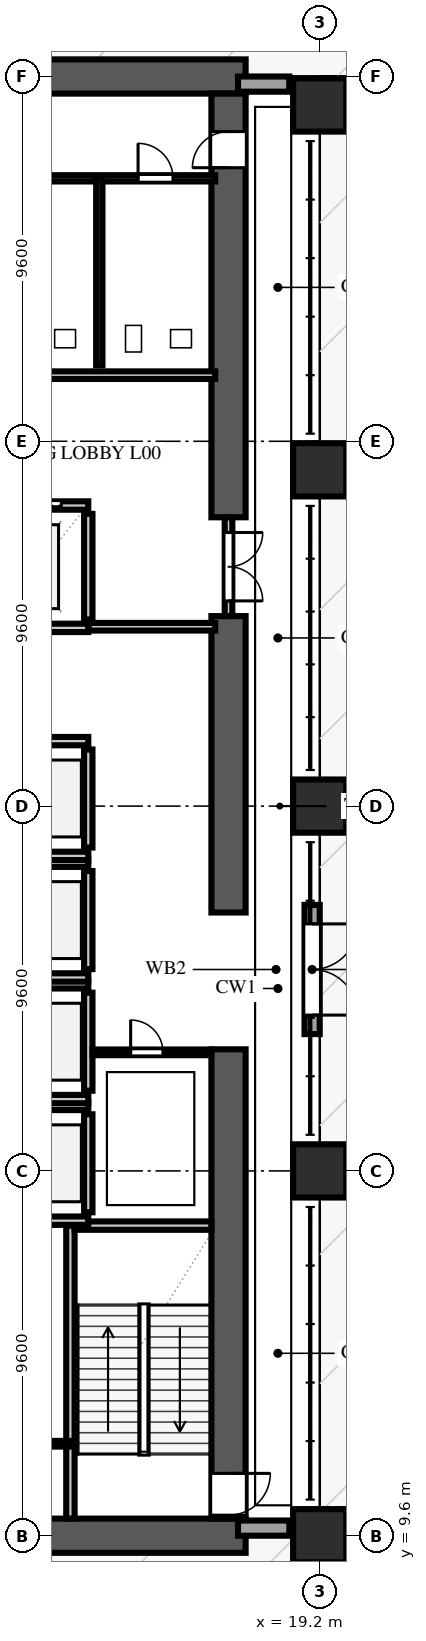
"""IFC4 building model, lengths in metres.
Left out: names, types, materials, properties, quantities, classifications, styles, units other than length and angle.
Written with IfcOpenShell. Run it as: python <this file> out.ifc"""

import sys

from ifc_helpers import new_model, si_unit, direction, frame, frame_2d, origin, origin_2d, place, context, subcontext, project, spatial, rectangle, extrude, element, fill, save


model = new_model("IFC4")
c1 = context("Model", 3, precision=1e-05, world=origin(), true_north=direction((0.0, 1.0)))
c2 = subcontext(c1, "Body", "Model", "MODEL_VIEW")
j1 = project(units=[si_unit("LENGTHUNIT", "METRE"), si_unit("PLANEANGLEUNIT", "RADIAN")], contexts=[c1])
p1 = place(None, origin())
s1 = spatial("IfcSite", under=j1, at=p1, CompositionType="ELEMENT")
p2 = place(p1, origin())
s2 = spatial("IfcBuilding", under=s1, at=p2, CompositionType="ELEMENT")
p3 = place(p2, origin())
s3 = spatial("IfcBuildingStorey", under=s2, at=p3, CompositionType="ELEMENT", Elevation=0.0)
p4 = place(p3, frame((2.65, 9.6, 0.0), z_axis=(0.0, 0.0, 1.0), x_axis=(1.0, 0.0, 0.0)))
e1 = element("IfcWall", 1, at=p4, inside=s3, PredefinedType="SHEAR", context=c2, shape_type="SweptSolid", body=[
    extrude(rectangle(XDim=14.6, YDim=0.9, at=frame_2d((7.3, 0.0))), origin(), (0.0, 0.0, 1.0), 4.86),
])
p5 = place(p4, frame((1.6, 0.0, 0.0)))
e2 = element("IfcOpeningElement", 2, at=p5, cuts=e1, PredefinedType="OPENING", context=c2, shape_type="SweptSolid", body=[
    extrude(rectangle(XDim=1.8, YDim=2.2, at=frame_2d((0.9, 1.1))), frame((0.0, 0.462, 0.0), z_axis=(0.0, -1.0, 0.0), x_axis=(1.0, 0.0, 0.0)), (0.0, 0.0, 1.0), 0.924),
])
p6 = place(p3, frame((2.65, 48.0, 0.0), z_axis=(0.0, 0.0, 1.0), x_axis=(1.0, 0.0, 0.0)))
e3 = element("IfcWall", 3, at=p6, inside=s3, PredefinedType="SHEAR", context=c2, shape_type="SweptSolid", body=[
    extrude(rectangle(XDim=14.6, YDim=0.9, at=frame_2d((7.3, 0.0))), origin(), (0.0, 0.0, 1.0), 4.86),
])
p7 = place(p3, frame((16.8, 10.05, 0.0), z_axis=(0.0, 0.0, 1.0), x_axis=(0.0, 1.0, 0.0)))
e4 = element("IfcWall", 4, at=p7, inside=s3, PredefinedType="SHEAR", context=c2, shape_type="SweptSolid", body=[
    extrude(rectangle(XDim=12.35, YDim=0.9, at=frame_2d((6.175, 0.0))), origin(), (0.0, 0.0, 1.0), 4.86),
])
p8 = place(p7, frame((0.09, 0.0, 0.0)))
e5 = element("IfcOpeningElement", 5, at=p8, cuts=e4, PredefinedType="OPENING", context=c2, shape_type="SweptSolid", body=[
    extrude(rectangle(XDim=1.1, YDim=2.2, at=frame_2d((0.55, 1.1))), frame((0.0, 0.462, 0.0), z_axis=(0.0, -1.0, 0.0), x_axis=(1.0, 0.0, 0.0)), (0.0, 0.0, 1.0), 0.924),
])
p9 = place(p3, frame((16.8, 26.0, 0.0), z_axis=(0.0, 0.0, 1.0), x_axis=(0.0, 1.0, 0.0)))
e6 = element("IfcWall", 6, at=p9, inside=s3, PredefinedType="SHEAR", context=c2, shape_type="SweptSolid", body=[
    extrude(rectangle(XDim=7.8, YDim=0.9, at=frame_2d((3.9, 0.0))), origin(), (0.0, 0.0, 1.0), 4.86),
])
p10 = place(p3, frame((16.8, 36.4, 0.0), z_axis=(0.0, 0.0, 1.0), x_axis=(0.0, 1.0, 0.0)))
e7 = element("IfcWall", 7, at=p10, inside=s3, PredefinedType="SHEAR", context=c2, shape_type="SweptSolid", body=[
    extrude(rectangle(XDim=11.15, YDim=0.9, at=frame_2d((5.575, 0.0))), origin(), (0.0, 0.0, 1.0), 4.86),
])
p11 = place(p10, frame((9.2, 0.0, 0.0)))
e8 = element("IfcOpeningElement", 8, at=p11, cuts=e7, PredefinedType="OPENING", context=c2, shape_type="SweptSolid", body=[
    extrude(rectangle(XDim=0.95, YDim=2.15, at=frame_2d((0.475, 1.075))), frame((0.0, 0.462, 0.0), z_axis=(0.0, -1.0, 0.0), x_axis=(1.0, 0.0, 0.0)), (0.0, 0.0, 1.0), 0.924),
])
for number, where, z_axis, x_axis in (
    (9, (19.2, 9.6, 0.0), (0.0, 0.0, 1.0), (1.0, 0.0, 0.0)),
    (10, (19.2, 19.2, 0.0), (0.0, 0.0, 1.0), (1.0, 0.0, 0.0)),
    (11, (19.2, 28.8, 0.0), (0.0, 0.0, 1.0), (1.0, 0.0, 0.0)),
    (12, (19.2, 37.65, 0.0), (0.0, 0.0, 1.0), (1.0, 0.0, 0.0)),
    (13, (19.2, 47.25, 0.0), (0.0, 0.0, 1.0), (1.0, 0.0, 0.0)),
):
    element("IfcColumn", number, at=place(p3, frame(where, z_axis=z_axis, x_axis=x_axis)), inside=s3, PredefinedType="USERDEFINED", context=c2, shape_type="SweptSolid", body=[
        extrude(rectangle(XDim=1.4, YDim=1.4, at=origin_2d()), origin(), (0.0, 0.0, 1.0), 5.2),
    ])
p12 = place(p3, frame((17.05, 9.8, 0.0), z_axis=(0.0, 0.0, 1.0), x_axis=(1.0, 0.0, 0.0)))
e14 = element("IfcWall", 14, at=p12, inside=s3, PredefinedType="SOLIDWALL", context=c2, shape_type="SweptSolid", body=[
    extrude(rectangle(XDim=1.35, YDim=0.4, at=frame_2d((0.675, 0.0))), origin(), (0.0, 0.0, 1.0), 4.11),
])
p13 = place(p3, frame((17.05, 47.8, 0.0), z_axis=(0.0, 0.0, 1.0), x_axis=(1.0, 0.0, 0.0)))
e15 = element("IfcWall", 15, at=p13, inside=s3, PredefinedType="SOLIDWALL", context=c2, shape_type="SweptSolid", body=[
    extrude(rectangle(XDim=1.35, YDim=0.4, at=frame_2d((0.675, 0.0))), origin(), (0.0, 0.0, 1.0), 4.86),
])
p14 = place(p3, frame((19.0, 22.8, 0.0), z_axis=(0.0, 0.0, 1.0), x_axis=(0.0, 1.0, 0.0)))
e16 = element("IfcWall", 16, at=p14, inside=s3, PredefinedType="SOLIDWALL", context=c2, shape_type="SweptSolid", body=[
    extrude(rectangle(XDim=3.4, YDim=0.4, at=frame_2d((1.7, 0.0))), origin(), (0.0, 0.0, 1.0), 3.2),
])
p15 = place(p14, frame((0.5, 0.0, 0.0)))
e17 = element("IfcOpeningElement", 17, at=p15, cuts=e16, PredefinedType="OPENING", context=c2, shape_type="SweptSolid", body=[
    extrude(rectangle(XDim=2.4, YDim=2.6, at=frame_2d((1.2, 1.3))), frame((0.0, 0.212, 0.0), z_axis=(0.0, -1.0, 0.0), x_axis=(1.0, 0.0, 0.0)), (0.0, 0.0, 1.0), 0.424),
])
p16 = place(p3, frame((12.64, 10.05, 0.0), z_axis=(0.0, 0.0, 1.0), x_axis=(0.0, 1.0, 0.0)))
e18 = element("IfcWall", 18, at=p16, inside=s3, PredefinedType="SOLIDWALL", context=c2, shape_type="SweptSolid", body=[
    extrude(rectangle(XDim=7.71, YDim=0.22, at=frame_2d((3.855, 0.0))), origin(), (0.0, 0.0, 1.0), 4.86),
])
p17 = place(p3, frame((12.75, 17.76, 0.0), z_axis=(0.0, 0.0, 1.0), x_axis=(1.0, 0.0, 0.0)))
e19 = element("IfcWall", 19, at=p17, inside=s3, PredefinedType="SOLIDWALL", context=c2, shape_type="SweptSolid", body=[
    extrude(rectangle(XDim=3.6, YDim=0.22, at=frame_2d((1.8, 0.0))), origin(), (0.0, 0.0, 1.0), 4.86),
])
p18 = place(p3, frame((13.11, 18.11, 0.0), z_axis=(0.0, 0.0, 1.0), x_axis=(0.0, 1.0, 0.0)))
e20 = element("IfcWall", 20, at=p18, inside=s3, PredefinedType="SOLIDWALL", context=c2, shape_type="SweptSolid", body=[
    extrude(rectangle(XDim=2.58, YDim=0.22, at=frame_2d((1.29, 0.0))), origin(), (0.0, 0.0, 1.0), 4.86),
])
for number, where, z_axis, x_axis in (
    (21, (10.49, 17.89, 0.0), (0.0, 0.0, 1.0), (1.0, 0.0, 0.0)),
    (22, (10.49, 20.91, 0.0), (0.0, 0.0, 1.0), (1.0, 0.0, 0.0)),
):
    element("IfcWall", number, at=place(p3, frame(where, z_axis=z_axis, x_axis=x_axis)), inside=s3, PredefinedType="SOLIDWALL", context=c2, shape_type="SweptSolid", body=[
        extrude(rectangle(XDim=2.62, YDim=0.22, at=frame_2d((1.31, 0.0))), origin(), (0.0, 0.0, 1.0), 4.86),
    ])
p19 = place(p3, frame((13.11, 21.31, 0.0), z_axis=(0.0, 0.0, 1.0), x_axis=(0.0, 1.0, 0.0)))
e23 = element("IfcWall", 23, at=p19, inside=s3, PredefinedType="SOLIDWALL", context=c2, shape_type="SweptSolid", body=[
    extrude(rectangle(XDim=2.58, YDim=0.22, at=frame_2d((1.29, 0.0))), origin(), (0.0, 0.0, 1.0), 4.86),
])
for number, where, z_axis, x_axis in (
    (24, (10.49, 21.09, 0.0), (0.0, 0.0, 1.0), (1.0, 0.0, 0.0)),
    (25, (10.49, 24.11, 0.0), (0.0, 0.0, 1.0), (1.0, 0.0, 0.0)),
):
    element("IfcWall", number, at=place(p3, frame(where, z_axis=z_axis, x_axis=x_axis)), inside=s3, PredefinedType="SOLIDWALL", context=c2, shape_type="SweptSolid", body=[
        extrude(rectangle(XDim=2.62, YDim=0.22, at=frame_2d((1.31, 0.0))), origin(), (0.0, 0.0, 1.0), 4.86),
    ])
p20 = place(p3, frame((13.11, 24.51, 0.0), z_axis=(0.0, 0.0, 1.0), x_axis=(0.0, 1.0, 0.0)))
e26 = element("IfcWall", 26, at=p20, inside=s3, PredefinedType="SOLIDWALL", context=c2, shape_type="SweptSolid", body=[
    extrude(rectangle(XDim=2.58, YDim=0.22, at=frame_2d((1.29, 0.0))), origin(), (0.0, 0.0, 1.0), 4.86),
])
for number, where, z_axis, x_axis in (
    (27, (10.49, 24.29, 0.0), (0.0, 0.0, 1.0), (1.0, 0.0, 0.0)),
    (28, (10.49, 27.31, 0.0), (0.0, 0.0, 1.0), (1.0, 0.0, 0.0)),
):
    element("IfcWall", number, at=place(p3, frame(where, z_axis=z_axis, x_axis=x_axis)), inside=s3, PredefinedType="SOLIDWALL", context=c2, shape_type="SweptSolid", body=[
        extrude(rectangle(XDim=2.62, YDim=0.22, at=frame_2d((1.31, 0.0))), origin(), (0.0, 0.0, 1.0), 4.86),
    ])
p21 = place(p3, frame((13.11, 27.71, 0.0), z_axis=(0.0, 0.0, 1.0), x_axis=(0.0, 1.0, 0.0)))
e29 = element("IfcWall", 29, at=p21, inside=s3, PredefinedType="SOLIDWALL", context=c2, shape_type="SweptSolid", body=[
    extrude(rectangle(XDim=2.58, YDim=0.22, at=frame_2d((1.29, 0.0))), origin(), (0.0, 0.0, 1.0), 4.86),
])
for number, where, z_axis, x_axis in (
    (30, (10.49, 27.49, 0.0), (0.0, 0.0, 1.0), (1.0, 0.0, 0.0)),
    (31, (10.49, 30.51, 0.0), (0.0, 0.0, 1.0), (1.0, 0.0, 0.0)),
):
    element("IfcWall", number, at=place(p3, frame(where, z_axis=z_axis, x_axis=x_axis)), inside=s3, PredefinedType="SOLIDWALL", context=c2, shape_type="SweptSolid", body=[
        extrude(rectangle(XDim=2.62, YDim=0.22, at=frame_2d((1.31, 0.0))), origin(), (0.0, 0.0, 1.0), 4.86),
    ])
p22 = place(p3, frame((13.11, 33.71, 0.0), z_axis=(0.0, 0.0, 1.0), x_axis=(0.0, 1.0, 0.0)))
e32 = element("IfcWall", 32, at=p22, inside=s3, PredefinedType="SOLIDWALL", context=c2, shape_type="SweptSolid", body=[
    extrude(rectangle(XDim=2.78, YDim=0.22, at=frame_2d((1.39, 0.0))), origin(), (0.0, 0.0, 1.0), 4.86),
])
p23 = place(p3, frame((10.49, 33.49, 0.0), z_axis=(0.0, 0.0, 1.0), x_axis=(1.0, 0.0, 0.0)))
e33 = element("IfcWall", 33, at=p23, inside=s3, PredefinedType="SOLIDWALL", context=c2, shape_type="SweptSolid", body=[
    extrude(rectangle(XDim=2.62, YDim=0.22, at=frame_2d((1.31, 0.0))), origin(), (0.0, 0.0, 1.0), 4.86),
])
p24 = place(p3, frame((10.49, 36.71, 0.0), z_axis=(0.0, 0.0, 1.0), x_axis=(1.0, 0.0, 0.0)))
e34 = element("IfcWall", 34, at=p24, inside=s3, PredefinedType="SOLIDWALL", context=c2, shape_type="SweptSolid", body=[
    extrude(rectangle(XDim=2.62, YDim=0.22, at=frame_2d((1.31, 0.0))), origin(), (0.0, 0.0, 1.0), 4.86),
])
p25 = place(p24, frame((0.71, 0.0, 0.0)))
e35 = element("IfcOpeningElement", 35, at=p25, cuts=e34, PredefinedType="OPENING", context=c2, shape_type="SweptSolid", body=[
    extrude(rectangle(XDim=1.2, YDim=2.2, at=frame_2d((0.6, 1.1))), frame((0.0, 0.122, 0.0), z_axis=(0.0, -1.0, 0.0), x_axis=(1.0, 0.0, 0.0)), (0.0, 0.0, 1.0), 0.244),
])
p26 = place(p3, frame((13.12, 33.52, 0.0), z_axis=(0.0, 0.0, 1.0), x_axis=(1.0, 0.0, 0.0)))
e36 = element("IfcWall", 36, at=p26, inside=s3, PredefinedType="SOLIDWALL", context=c2, shape_type="SweptSolid", body=[
    extrude(rectangle(XDim=3.33, YDim=0.2, at=frame_2d((1.665, 0.0))), origin(), (0.0, 0.0, 1.0), 4.86),
])
p27 = place(p3, frame((6.32, 40.14, 0.0), z_axis=(0.0, 0.0, 1.0), x_axis=(1.0, 0.0, 0.0)))
e37 = element("IfcWall", 37, at=p27, inside=s3, PredefinedType="SOLIDWALL", context=c2, shape_type="SweptSolid", body=[
    extrude(rectangle(XDim=10.13, YDim=0.2, at=frame_2d((5.065, 0.0))), origin(), (0.0, 0.0, 1.0), 4.86),
])
p28 = place(p3, frame((16.8, 33.8, 0.0), z_axis=(0.0, 0.0, 1.0), x_axis=(0.0, 1.0, 0.0)))
e38 = element("IfcWall", 38, at=p28, inside=s3, PredefinedType="SOLIDWALL", context=c2, shape_type="SweptSolid", body=[
    extrude(rectangle(XDim=2.6, YDim=0.2, at=frame_2d((1.3, 0.0))), origin(), (0.0, 0.0, 1.0), 4.86),
])
p29 = place(p28, frame((0.4, 0.0, 0.0)))
e39 = element("IfcOpeningElement", 39, at=p29, cuts=e38, PredefinedType="OPENING", context=c2, shape_type="SweptSolid", body=[
    extrude(rectangle(XDim=1.8, YDim=2.2, at=frame_2d((0.9, 1.1))), frame((0.0, 0.112, 0.0), z_axis=(0.0, -1.0, 0.0), x_axis=(1.0, 0.0, 0.0)), (0.0, 0.0, 1.0), 0.224),
])
p30 = place(p3, frame((10.55, 12.02, 0.0), z_axis=(0.0, 0.0, 1.0), x_axis=(1.0, 0.0, 0.0)))
e40 = element("IfcWall", 40, at=p30, inside=s3, PredefinedType="PARTITIONING", context=c2, shape_type="SweptSolid", body=[
    extrude(rectangle(XDim=2.08, YDim=0.15, at=frame_2d((1.04, 0.0))), origin(), (0.0, 0.0, 1.0), 4.86),
])
p31 = place(p30, frame((0.5, 0.0, 0.0)))
e41 = element("IfcOpeningElement", 41, at=p31, cuts=e40, PredefinedType="OPENING", context=c2, shape_type="SweptSolid", body=[
    extrude(rectangle(XDim=0.85, YDim=2.1, at=frame_2d((0.425, 1.05))), frame((0.0, 0.087, 0.0), z_axis=(0.0, -1.0, 0.0), x_axis=(1.0, 0.0, 0.0)), (0.0, 0.0, 1.0), 0.174),
])
p32 = place(p3, frame((13.225, 22.32, 0.0), z_axis=(0.0, 0.0, 1.0), x_axis=(1.0, 0.0, 0.0)))
e42 = element("IfcWall", 42, at=p32, inside=s3, PredefinedType="PARTITIONING", context=c2, shape_type="SweptSolid", body=[
    extrude(rectangle(XDim=3.12, YDim=0.15, at=frame_2d((1.56, 0.0))), origin(), (0.0, 0.0, 1.0), 4.86),
])
p33 = place(p32, frame((1.0, 0.0, 0.0)))
e43 = element("IfcOpeningElement", 43, at=p33, cuts=e42, PredefinedType="OPENING", context=c2, shape_type="SweptSolid", body=[
    extrude(rectangle(XDim=0.85, YDim=2.1, at=frame_2d((0.425, 1.05))), frame((0.0, 0.087, 0.0), z_axis=(0.0, -1.0, 0.0), x_axis=(1.0, 0.0, 0.0)), (0.0, 0.0, 1.0), 0.174),
])
p34 = place(p3, frame((6.32, 45.32, 0.0), z_axis=(0.0, 0.0, 1.0), x_axis=(1.0, 0.0, 0.0)))
e44 = element("IfcWall", 44, at=p34, inside=s3, PredefinedType="PLUMBINGWALL", context=c2, shape_type="SweptSolid", body=[
    extrude(rectangle(XDim=10.13, YDim=0.165, at=frame_2d((5.065, 0.0))), origin(), (0.0, 0.0, 1.0), 4.86),
])
p35 = place(p34, frame((0.9, 0.0, 0.0)))
e45 = element("IfcOpeningElement", 45, at=p35, cuts=e44, PredefinedType="OPENING", context=c2, shape_type="SweptSolid", body=[
    extrude(rectangle(XDim=0.92, YDim=2.15, at=frame_2d((0.46, 1.075))), frame((0.0, 0.094, 0.0), z_axis=(0.0, -1.0, 0.0), x_axis=(1.0, 0.0, 0.0)), (0.0, 0.0, 1.0), 0.189),
])
p36 = place(p34, frame((4.6, 0.0, 0.0)))
e46 = element("IfcOpeningElement", 46, at=p36, cuts=e44, PredefinedType="OPENING", context=c2, shape_type="SweptSolid", body=[
    extrude(rectangle(XDim=0.92, YDim=2.15, at=frame_2d((0.46, 1.075))), frame((0.0, 0.094, 0.0), z_axis=(0.0, -1.0, 0.0), x_axis=(1.0, 0.0, 0.0)), (0.0, 0.0, 1.0), 0.189),
])
p37 = place(p34, frame((8.1, 0.0, 0.0)))
e47 = element("IfcOpeningElement", 47, at=p37, cuts=e44, PredefinedType="OPENING", context=c2, shape_type="SweptSolid", body=[
    extrude(rectangle(XDim=0.92, YDim=2.15, at=frame_2d((0.46, 1.075))), frame((0.0, 0.094, 0.0), z_axis=(0.0, -1.0, 0.0), x_axis=(1.0, 0.0, 0.0)), (0.0, 0.0, 1.0), 0.189),
])
p38 = place(p3, frame((13.4, 40.4, 0.0), z_axis=(0.0, 0.0, 1.0), x_axis=(0.0, 1.0, 0.0)))
e48 = element("IfcWall", 48, at=p38, inside=s3, PredefinedType="PLUMBINGWALL", context=c2, shape_type="SweptSolid", body=[
    extrude(rectangle(XDim=4.92, YDim=0.165, at=frame_2d((2.46, 0.0))), origin(), (0.0, 0.0, 1.0), 4.86),
])
p39 = place(p15, frame((2.4, 0.0, 0.0), z_axis=(0.0, 0.0, 1.0), x_axis=(-1.0, 0.0, 0.0)))
e49 = element("IfcDoor", 49, at=p39, inside=s3, OperationType="DOUBLE_SWING_LEFT", PredefinedType="DOOR", context=c2, shape_type="SweptSolid", body=[
    extrude(rectangle(XDim=2.4, YDim=2.6, at=frame_2d((1.2, 1.3))), frame((0.0, 0.025, 0.0), z_axis=(0.0, -1.0, 0.0), x_axis=(1.0, 0.0, 0.0)), (0.0, 0.0, 1.0), 0.05),
])
fill(e17, e49)
p40 = place(p8, frame((1.1, 0.0, 0.0), z_axis=(0.0, 0.0, 1.0), x_axis=(-1.0, 0.0, 0.0)))
e50 = element("IfcDoor", 50, at=p40, inside=s3, OperationType="SINGLE_SWING_LEFT", PredefinedType="DOOR", context=c2, shape_type="SweptSolid", body=[
    extrude(rectangle(XDim=1.1, YDim=2.2, at=frame_2d((0.55, 1.1))), frame((0.0, 0.025, 0.0), z_axis=(0.0, -1.0, 0.0), x_axis=(1.0, 0.0, 0.0)), (0.0, 0.0, 1.0), 0.05),
])
fill(e5, e50)
p41 = place(p25, origin())
e51 = element("IfcDoor", 51, at=p41, inside=s3, OperationType="DOUBLE_DOOR_SLIDING", PredefinedType="DOOR", context=c2, shape_type="SweptSolid", body=[
    extrude(rectangle(XDim=1.2, YDim=2.2, at=frame_2d((0.6, 1.1))), frame((0.0, 0.025, 0.0), z_axis=(0.0, -1.0, 0.0), x_axis=(1.0, 0.0, 0.0)), (0.0, 0.0, 1.0), 0.05),
])
fill(e35, e51)
p42 = place(p11, origin())
e52 = element("IfcDoor", 52, at=p42, inside=s3, OperationType="SINGLE_SWING_LEFT", PredefinedType="DOOR", context=c2, shape_type="SweptSolid", body=[
    extrude(rectangle(XDim=0.95, YDim=2.15, at=frame_2d((0.475, 1.075))), frame((0.0, 0.025, 0.0), z_axis=(0.0, -1.0, 0.0), x_axis=(1.0, 0.0, 0.0)), (0.0, 0.0, 1.0), 0.05),
])
fill(e8, e52)
p43 = place(p29, frame((1.8, 0.0, 0.0), z_axis=(0.0, 0.0, 1.0), x_axis=(-1.0, 0.0, 0.0)))
e53 = element("IfcDoor", 53, at=p43, inside=s3, OperationType="DOUBLE_DOOR_SINGLE_SWING", PredefinedType="DOOR", context=c2, shape_type="SweptSolid", body=[
    extrude(rectangle(XDim=1.8, YDim=2.2, at=frame_2d((0.9, 1.1))), frame((0.0, 0.025, 0.0), z_axis=(0.0, -1.0, 0.0), x_axis=(1.0, 0.0, 0.0)), (0.0, 0.0, 1.0), 0.05),
])
fill(e39, e53)
p44 = place(p33, origin())
e54 = element("IfcDoor", 54, at=p44, inside=s3, OperationType="SINGLE_SWING_LEFT", PredefinedType="DOOR", context=c2, shape_type="SweptSolid", body=[
    extrude(rectangle(XDim=0.85, YDim=2.1, at=frame_2d((0.425, 1.05))), frame((0.0, 0.025, 0.0), z_axis=(0.0, -1.0, 0.0), x_axis=(1.0, 0.0, 0.0)), (0.0, 0.0, 1.0), 0.05),
])
fill(e43, e54)
p45 = place(p37, origin())
e55 = element("IfcDoor", 55, at=p45, inside=s3, OperationType="SINGLE_SWING_LEFT", PredefinedType="DOOR", context=c2, shape_type="SweptSolid", body=[
    extrude(rectangle(XDim=0.92, YDim=2.15, at=frame_2d((0.46, 1.075))), frame((0.0, 0.025, 0.0), z_axis=(0.0, -1.0, 0.0), x_axis=(1.0, 0.0, 0.0)), (0.0, 0.0, 1.0), 0.05),
])
fill(e47, e55)
save(model, sys.argv[1])
